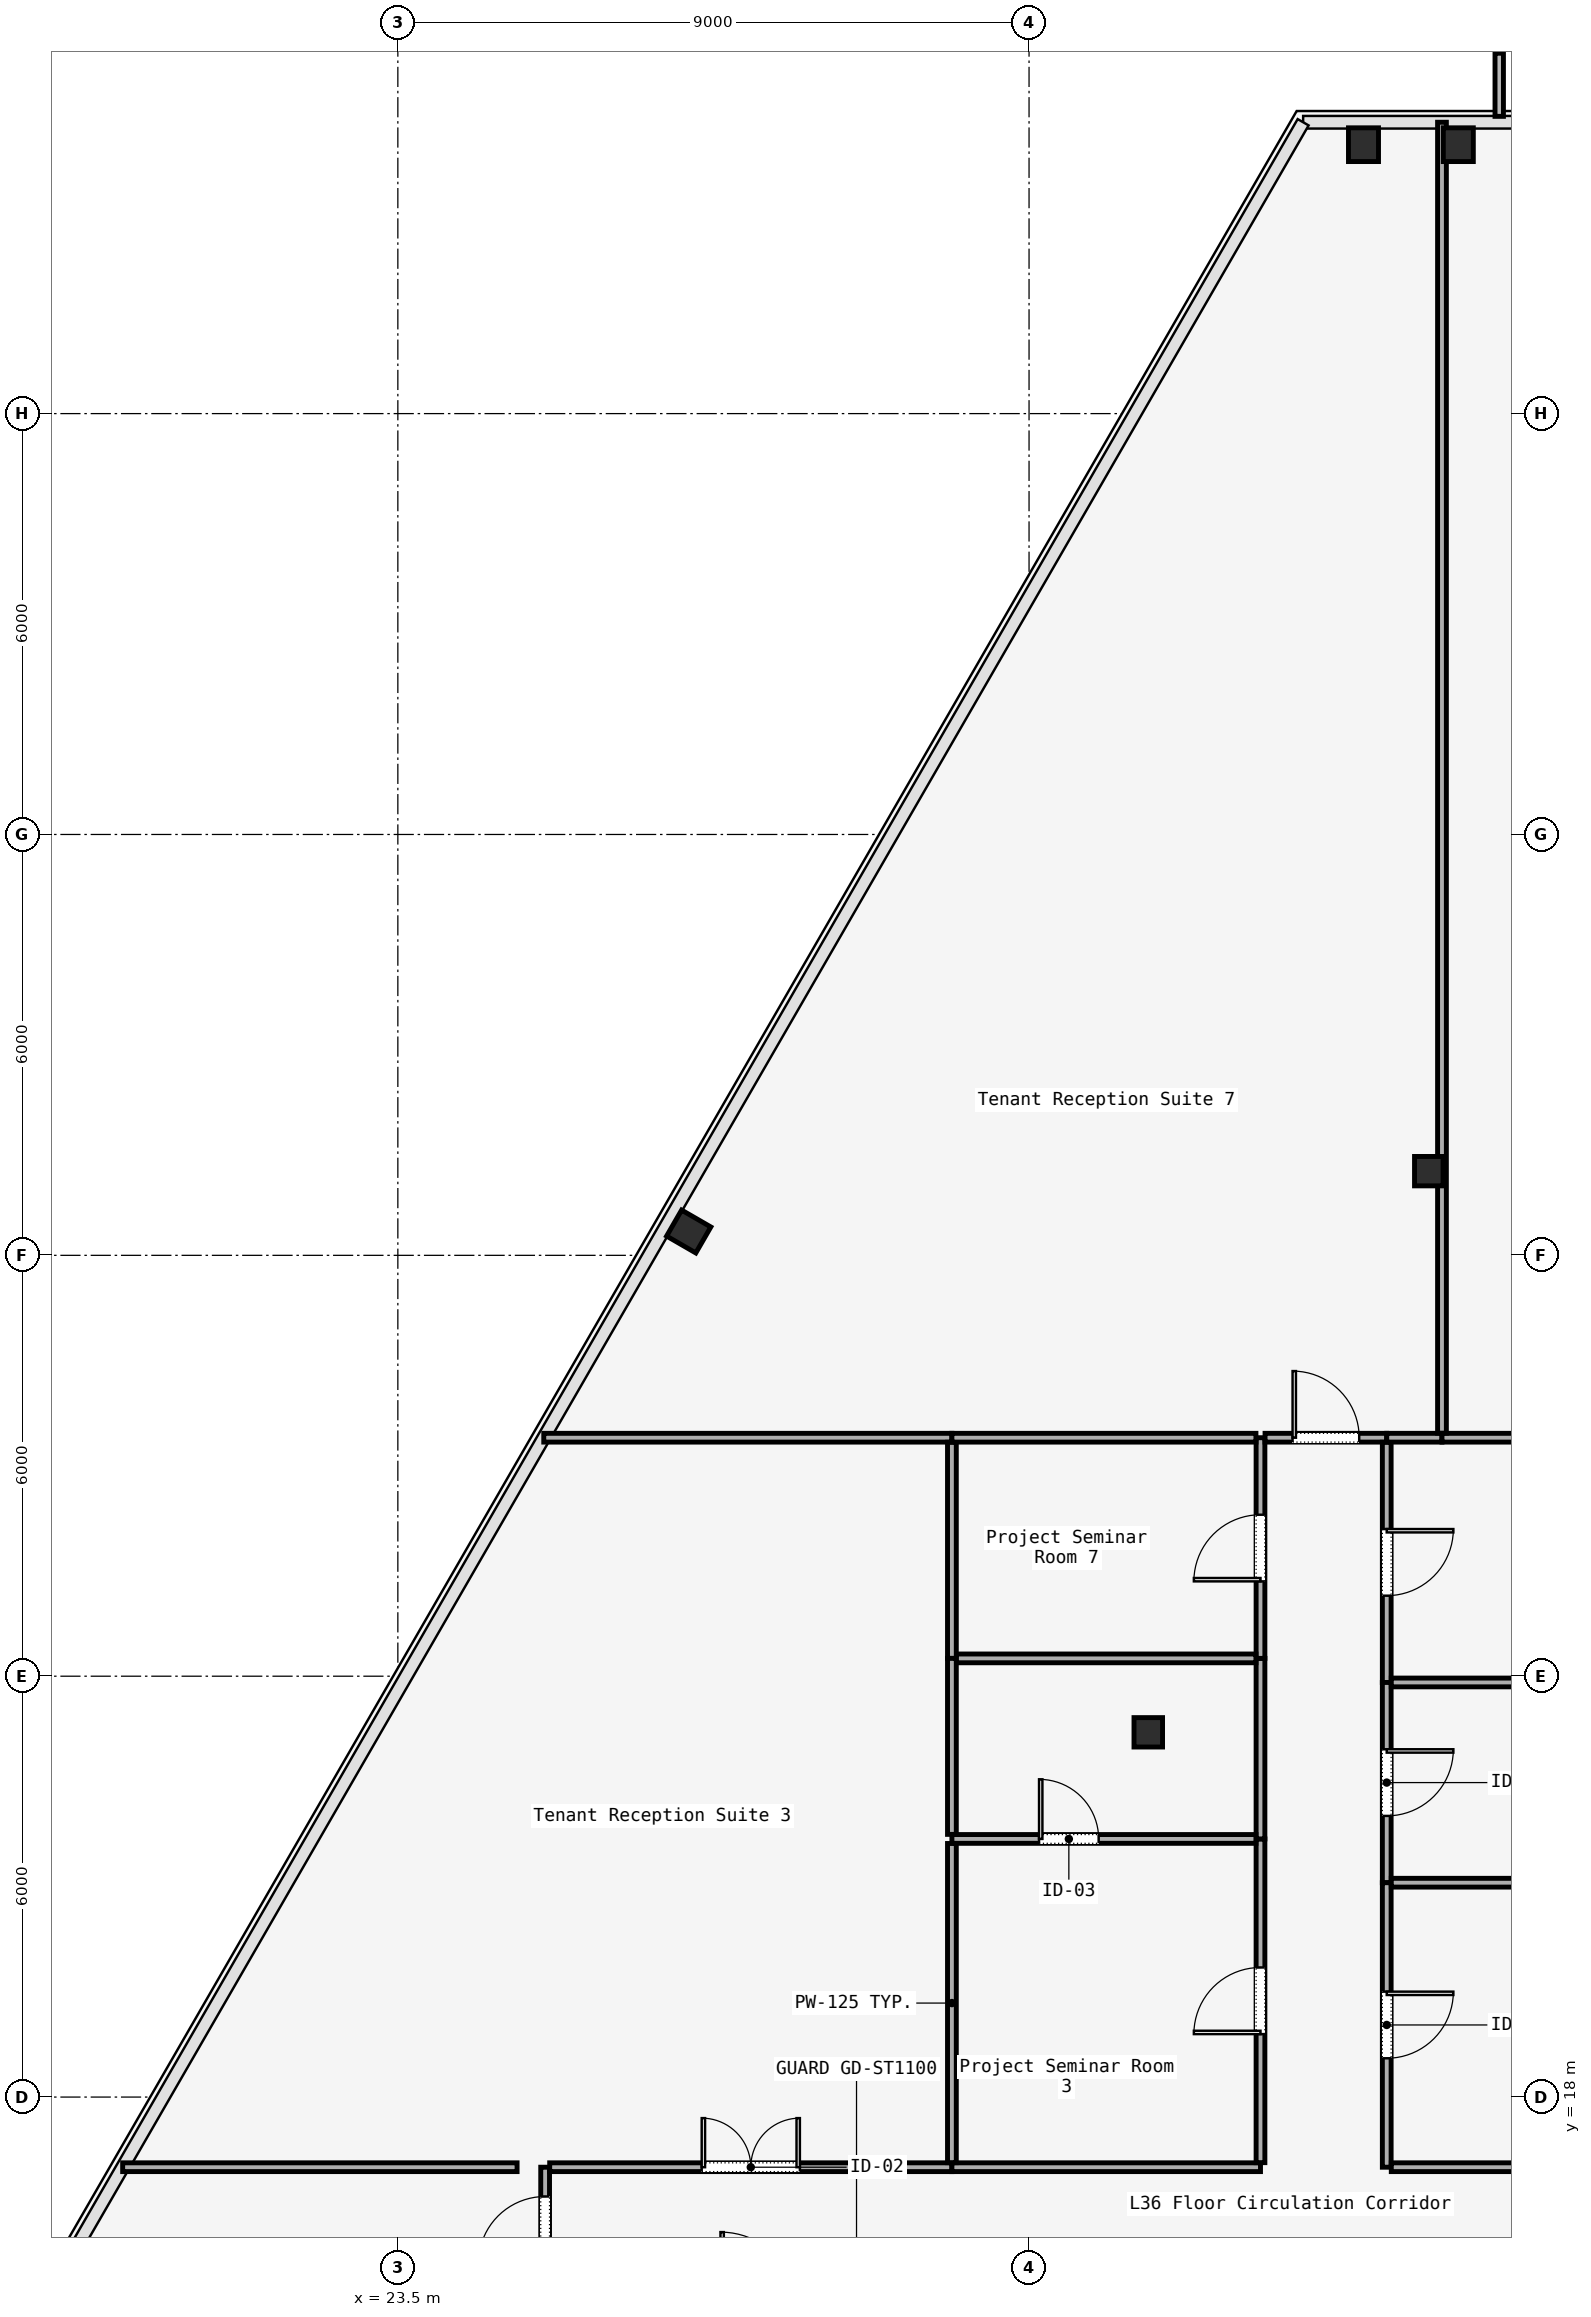
"""IFC4 building model, lengths in metres.
Left out: names, types, materials, properties, quantities, classifications, styles, units other than length and angle.
Written with IfcOpenShell. Run it as: python <this file> out.ifc"""

import sys

from ifc_helpers import new_model, si_unit, direction, frame, frame_2d, origin, origin_2d, place, context, subcontext, project, spatial, rectangle, i_section, extrude, element, fill, save


model = new_model("IFC4")
c1 = context("Model", 3, precision=1e-05, world=origin(), true_north=direction((0.0, 1.0)))
c2 = subcontext(c1, "Body", "Model", "MODEL_VIEW")
j1 = project(units=[si_unit("LENGTHUNIT", "METRE"), si_unit("PLANEANGLEUNIT", "RADIAN")], contexts=[c1])
p1 = place(None, origin())
s1 = spatial("IfcSite", under=j1, at=p1, CompositionType="ELEMENT")
p2 = place(p1, origin())
s2 = spatial("IfcBuilding", under=s1, at=p2, CompositionType="ELEMENT")
p3 = place(p2, frame((0.0, 0.0, 153.6)))
s3 = spatial("IfcBuildingStorey", under=s2, at=p3, CompositionType="ELEMENT", Elevation=153.6)
for number, where, z_axis, x_axis in (
    (1, (34.2, 23.2, 0.0), (0.0, 0.0, 1.0), (1.0, 0.0, 0.0)),
    (2, (38.2, 31.2, 0.0), (0.0, 0.0, 1.0), (1.0, 0.0, 0.0)),
):
    element("IfcColumn", number, at=place(p3, frame(where, z_axis=z_axis, x_axis=x_axis)), inside=s3, PredefinedType="COLUMN", context=c2, shape_type="SweptSolid", body=[
        extrude(i_section(OverallWidth=0.407, OverallDepth=0.419, WebThickness=0.031, FlangeThickness=0.049, FilletRadius=0.015, at=origin_2d()), origin(), (0.0, 0.0, 1.0), 3.58),
    ])
for number, where, z_axis, x_axis in (
    (3, (38.621, 45.834, 0.0), (0.0, 0.0, 1.0), (1.0, 0.0, 0.0)),
    (4, (37.269, 45.834, 0.0), (0.0, 0.0, 1.0), (1.0, 0.0, 0.0)),
    (5, (27.647, 30.34, 0.0), (0.0, 0.0, 1.0), (0.5, 0.866, 0.0)),
):
    element("IfcColumn", number, at=place(p3, frame(where, z_axis=z_axis, x_axis=x_axis)), inside=s3, PredefinedType="COLUMN", context=c2, shape_type="SweptSolid", body=[
        extrude(i_section(OverallWidth=0.428, OverallDepth=0.481, WebThickness=0.051, FlangeThickness=0.065, FilletRadius=0.015, at=origin_2d()), origin(), (0.0, 0.0, 1.0), 3.58),
    ])
p4 = place(p3, frame((25.6, 15.215, 0.0), z_axis=(0.0, 0.0, 1.0), x_axis=(0.0, 1.0, 0.0)))
e6 = element("IfcWall", 6, at=p4, inside=s3, PredefinedType="PARTITIONING", context=c2, shape_type="SweptSolid", body=[
    extrude(rectangle(XDim=1.785, YDim=0.125, at=frame_2d((0.893, 0.0))), origin(), (0.0, 0.0, 1.0), 3.01),
])
p5 = place(p4, frame((0.417, 0.0, 0.0)))
e7 = element("IfcOpeningElement", 7, at=p5, cuts=e6, PredefinedType="OPENING", context=c2, shape_type="SweptSolid", body=[
    extrude(rectangle(XDim=0.95, YDim=2.2, at=frame_2d((0.475, 1.1))), frame((0.0, 0.062, 0.0), z_axis=(0.0, -1.0, 0.0), x_axis=(1.0, 0.0, 0.0)), (0.0, 0.0, 1.0), 0.125),
])
p6 = place(p3, frame((25.665, 17.0, 0.0), z_axis=(0.0, 0.0, 1.0), x_axis=(1.0, 0.0, 0.0)))
e8 = element("IfcWall", 8, at=p6, inside=s3, PredefinedType="PARTITIONING", context=c2, shape_type="SweptSolid", body=[
    extrude(rectangle(XDim=5.735, YDim=0.125, at=frame_2d((2.867, 0.0))), origin(), (0.0, 0.0, 1.0), 3.01),
])
p7 = place(p6, frame((2.167, 0.0, 0.0)))
e9 = element("IfcOpeningElement", 9, at=p7, cuts=e8, PredefinedType="OPENING", context=c2, shape_type="SweptSolid", body=[
    extrude(rectangle(XDim=1.4, YDim=2.2, at=frame_2d((0.7, 1.1))), frame((0.0, 0.062, 0.0), z_axis=(0.0, -1.0, 0.0), x_axis=(1.0, 0.0, 0.0)), (0.0, 0.0, 1.0), 0.125),
])
p8 = place(p3, frame((31.4, 17.0, 0.0), z_axis=(0.0, 0.0, 1.0), x_axis=(1.0, 0.0, 0.0)))
e10 = element("IfcWall", 10, at=p8, inside=s3, PredefinedType="PARTITIONING", context=c2, shape_type="SweptSolid", body=[
    extrude(rectangle(XDim=4.4, YDim=0.125, at=frame_2d((2.2, 0.0))), origin(), (0.0, 0.0, 1.0), 3.01),
])
p9 = place(p3, frame((35.8, 17.065, 0.0), z_axis=(0.0, 0.0, 1.0), x_axis=(0.0, 1.0, 0.0)))
e11 = element("IfcWall", 11, at=p9, inside=s3, PredefinedType="PARTITIONING", context=c2, shape_type="SweptSolid", body=[
    extrude(rectangle(XDim=4.615, YDim=0.125, at=frame_2d((2.308, 0.0))), origin(), (0.0, 0.0, 1.0), 3.01),
])
p10 = place(p9, frame((1.833, 0.0, 0.0)))
e12 = element("IfcOpeningElement", 12, at=p10, cuts=e11, PredefinedType="OPENING", context=c2, shape_type="SweptSolid", body=[
    extrude(rectangle(XDim=0.95, YDim=2.2, at=frame_2d((0.475, 1.1))), frame((0.0, 0.062, 0.0), z_axis=(0.0, -1.0, 0.0), x_axis=(1.0, 0.0, 0.0)), (0.0, 0.0, 1.0), 0.125),
])
p11 = place(p3, frame((35.8, 21.68, 0.0), z_axis=(0.0, 0.0, 1.0), x_axis=(0.0, 1.0, 0.0)))
e13 = element("IfcWall", 13, at=p11, inside=s3, PredefinedType="PARTITIONING", context=c2, shape_type="SweptSolid", body=[
    extrude(rectangle(XDim=2.574, YDim=0.125, at=frame_2d((1.287, 0.0))), origin(), (0.0, 0.0, 1.0), 3.01),
])
p12 = place(p3, frame((35.8, 24.254, 0.0), z_axis=(0.0, 0.0, 1.0), x_axis=(0.0, 1.0, 0.0)))
e14 = element("IfcWall", 14, at=p12, inside=s3, PredefinedType="PARTITIONING", context=c2, shape_type="SweptSolid", body=[
    extrude(rectangle(XDim=3.146, YDim=0.125, at=frame_2d((1.573, 0.0))), origin(), (0.0, 0.0, 1.0), 3.01),
])
p13 = place(p12, frame((1.098, 0.0, 0.0)))
e15 = element("IfcOpeningElement", 15, at=p13, cuts=e14, PredefinedType="OPENING", context=c2, shape_type="SweptSolid", body=[
    extrude(rectangle(XDim=0.95, YDim=2.2, at=frame_2d((0.475, 1.1))), frame((0.0, 0.062, 0.0), z_axis=(0.0, -1.0, 0.0), x_axis=(1.0, 0.0, 0.0)), (0.0, 0.0, 1.0), 0.125),
])
p14 = place(p3, frame((35.865, 27.4, 0.0), z_axis=(0.0, 0.0, 1.0), x_axis=(1.0, 0.0, 0.0)))
e16 = element("IfcWall", 16, at=p14, inside=s3, PredefinedType="PARTITIONING", context=c2, shape_type="SweptSolid", body=[
    extrude(rectangle(XDim=1.735, YDim=0.125, at=frame_2d((0.868, 0.0))), origin(), (0.0, 0.0, 1.0), 3.01),
])
p15 = place(p14, frame((0.393, 0.0, 0.0)))
e17 = element("IfcOpeningElement", 17, at=p15, cuts=e16, PredefinedType="OPENING", context=c2, shape_type="SweptSolid", body=[
    extrude(rectangle(XDim=0.95, YDim=2.2, at=frame_2d((0.475, 1.1))), frame((0.0, 0.062, 0.0), z_axis=(0.0, -1.0, 0.0), x_axis=(1.0, 0.0, 0.0)), (0.0, 0.0, 1.0), 0.125),
])
p16 = place(p3, frame((37.6, 27.335, 0.0), z_axis=(0.0, 0.0, 1.0), x_axis=(0.0, -1.0, 0.0)))
e18 = element("IfcWall", 18, at=p16, inside=s3, PredefinedType="PARTITIONING", context=c2, shape_type="SweptSolid", body=[
    extrude(rectangle(XDim=3.424, YDim=0.125, at=frame_2d((1.712, 0.0))), origin(), (0.0, 0.0, 1.0), 3.01),
])
p17 = place(p16, frame((1.237, 0.0, 0.0)))
e19 = element("IfcOpeningElement", 19, at=p17, cuts=e18, PredefinedType="OPENING", context=c2, shape_type="SweptSolid", body=[
    extrude(rectangle(XDim=0.95, YDim=2.2, at=frame_2d((0.475, 1.1))), frame((0.0, 0.062, 0.0), z_axis=(0.0, -1.0, 0.0), x_axis=(1.0, 0.0, 0.0)), (0.0, 0.0, 1.0), 0.125),
])
p18 = place(p3, frame((37.6, 23.911, 0.0), z_axis=(0.0, 0.0, 1.0), x_axis=(0.0, -1.0, 0.0)))
e20 = element("IfcWall", 20, at=p18, inside=s3, PredefinedType="PARTITIONING", context=c2, shape_type="SweptSolid", body=[
    extrude(rectangle(XDim=2.855, YDim=0.125, at=frame_2d((1.427, 0.0))), origin(), (0.0, 0.0, 1.0), 3.01),
])
p19 = place(p18, frame((0.952, 0.0, 0.0)))
e21 = element("IfcOpeningElement", 21, at=p19, cuts=e20, PredefinedType="OPENING", context=c2, shape_type="SweptSolid", body=[
    extrude(rectangle(XDim=0.95, YDim=2.2, at=frame_2d((0.475, 1.1))), frame((0.0, 0.062, 0.0), z_axis=(0.0, -1.0, 0.0), x_axis=(1.0, 0.0, 0.0)), (0.0, 0.0, 1.0), 0.125),
])
p20 = place(p3, frame((37.6, 21.056, 0.0), z_axis=(0.0, 0.0, 1.0), x_axis=(0.0, -1.0, 0.0)))
e22 = element("IfcWall", 22, at=p20, inside=s3, PredefinedType="PARTITIONING", context=c2, shape_type="SweptSolid", body=[
    extrude(rectangle(XDim=4.056, YDim=0.125, at=frame_2d((2.028, 0.0))), origin(), (0.0, 0.0, 1.0), 3.01),
])
p21 = place(p20, frame((1.553, 0.0, 0.0)))
e23 = element("IfcOpeningElement", 23, at=p21, cuts=e22, PredefinedType="OPENING", context=c2, shape_type="SweptSolid", body=[
    extrude(rectangle(XDim=0.95, YDim=2.2, at=frame_2d((0.475, 1.1))), frame((0.0, 0.062, 0.0), z_axis=(0.0, -1.0, 0.0), x_axis=(1.0, 0.0, 0.0)), (0.0, 0.0, 1.0), 0.125),
])
p22 = place(p3, frame((37.665, 17.0, 0.0), z_axis=(0.0, 0.0, 1.0), x_axis=(1.0, 0.0, 0.0)))
e24 = element("IfcWall", 24, at=p22, inside=s3, PredefinedType="PARTITIONING", context=c2, shape_type="SweptSolid", body=[
    extrude(rectangle(XDim=3.445, YDim=0.125, at=frame_2d((1.723, 0.0))), origin(), (0.0, 0.0, 1.0), 3.01),
])
p23 = place(p3, frame((19.576, 17.0, 0.0), z_axis=(0.0, 0.0, 1.0), x_axis=(1.0, 0.0, 0.0)))
e25 = element("IfcWall", 25, at=p23, inside=s3, PredefinedType="PARTITIONING", context=c2, shape_type="SweptSolid", body=[
    extrude(rectangle(XDim=5.624, YDim=0.125, at=frame_2d((2.812, 0.0))), origin(), (0.0, 0.0, 1.0), 3.01),
])
p24 = place(p3, frame((37.665, 21.056, 0.0), z_axis=(0.0, 0.0, 1.0), x_axis=(1.0, 0.0, 0.0)))
e26 = element("IfcWall", 26, at=p24, inside=s3, PredefinedType="PARTITIONING", context=c2, shape_type="SweptSolid", body=[
    extrude(rectangle(XDim=3.38, YDim=0.125, at=frame_2d((1.69, 0.0))), origin(), (0.0, 0.0, 1.0), 3.01),
])
p25 = place(p3, frame((31.4, 21.68, 0.0), z_axis=(0.0, 0.0, 1.0), x_axis=(1.0, 0.0, 0.0)))
e27 = element("IfcWall", 27, at=p25, inside=s3, PredefinedType="PARTITIONING", context=c2, shape_type="SweptSolid", body=[
    extrude(rectangle(XDim=4.335, YDim=0.125, at=frame_2d((2.167, 0.0))), origin(), (0.0, 0.0, 1.0), 3.01),
])
p26 = place(p25, frame((1.242, 0.0, 0.0)))
e28 = element("IfcOpeningElement", 28, at=p26, cuts=e27, PredefinedType="OPENING", context=c2, shape_type="SweptSolid", body=[
    extrude(rectangle(XDim=0.85, YDim=2.15, at=frame_2d((0.425, 1.075))), frame((0.0, 0.062, 0.0), z_axis=(0.0, -1.0, 0.0), x_axis=(1.0, 0.0, 0.0)), (0.0, 0.0, 1.0), 0.125),
])
p27 = place(p3, frame((31.4, 17.065, 0.0), z_axis=(0.0, 0.0, 1.0), x_axis=(0.0, 1.0, 0.0)))
e29 = element("IfcWall", 29, at=p27, inside=s3, PredefinedType="PARTITIONING", context=c2, shape_type="SweptSolid", body=[
    extrude(rectangle(XDim=4.55, YDim=0.125, at=frame_2d((2.275, 0.0))), origin(), (0.0, 0.0, 1.0), 3.01),
])
p28 = place(p3, frame((25.581, 27.4, 0.0), z_axis=(0.0, 0.0, 1.0), x_axis=(1.0, 0.0, 0.0)))
e30 = element("IfcWall", 30, at=p28, inside=s3, PredefinedType="PARTITIONING", context=c2, shape_type="SweptSolid", body=[
    extrude(rectangle(XDim=5.819, YDim=0.125, at=frame_2d((2.91, 0.0))), origin(), (0.0, 0.0, 1.0), 3.01),
])
p29 = place(p3, frame((31.4, 27.335, 0.0), z_axis=(0.0, 0.0, 1.0), x_axis=(0.0, -1.0, 0.0)))
e31 = element("IfcWall", 31, at=p29, inside=s3, PredefinedType="PARTITIONING", context=c2, shape_type="SweptSolid", body=[
    extrude(rectangle(XDim=3.081, YDim=0.125, at=frame_2d((1.541, 0.0))), origin(), (0.0, 0.0, 1.0), 3.01),
])
p30 = place(p3, frame((31.4, 24.254, 0.0), z_axis=(0.0, 0.0, 1.0), x_axis=(0.0, -1.0, 0.0)))
e32 = element("IfcWall", 32, at=p30, inside=s3, PredefinedType="PARTITIONING", context=c2, shape_type="SweptSolid", body=[
    extrude(rectangle(XDim=2.509, YDim=0.125, at=frame_2d((1.254, 0.0))), origin(), (0.0, 0.0, 1.0), 3.01),
])
p31 = place(p3, frame((37.665, 23.911, 0.0), z_axis=(0.0, 0.0, 1.0), x_axis=(1.0, 0.0, 0.0)))
e33 = element("IfcWall", 33, at=p31, inside=s3, PredefinedType="PARTITIONING", context=c2, shape_type="SweptSolid", body=[
    extrude(rectangle(XDim=3.985, YDim=0.125, at=frame_2d((1.992, 0.0))), origin(), (0.0, 0.0, 1.0), 3.01),
])
p32 = place(p3, frame((31.465, 24.254, 0.0), z_axis=(0.0, 0.0, 1.0), x_axis=(1.0, 0.0, 0.0)))
e34 = element("IfcWall", 34, at=p32, inside=s3, PredefinedType="PARTITIONING", context=c2, shape_type="SweptSolid", body=[
    extrude(rectangle(XDim=4.27, YDim=0.125, at=frame_2d((2.135, 0.0))), origin(), (0.0, 0.0, 1.0), 3.01),
])
p33 = place(p3, frame((37.6, 27.4, 0.0), z_axis=(0.0, 0.0, 1.0), x_axis=(1.0, 0.0, 0.0)))
e35 = element("IfcWall", 35, at=p33, inside=s3, PredefinedType="PARTITIONING", context=c2, shape_type="SweptSolid", body=[
    extrude(rectangle(XDim=0.788, YDim=0.125, at=frame_2d((0.394, 0.0))), origin(), (0.0, 0.0, 1.0), 3.01),
])
p34 = place(p3, frame((38.388, 27.4, 0.0), z_axis=(0.0, 0.0, 1.0), x_axis=(1.0, 0.0, 0.0)))
e36 = element("IfcWall", 36, at=p34, inside=s3, PredefinedType="PARTITIONING", context=c2, shape_type="SweptSolid", body=[
    extrude(rectangle(XDim=3.197, YDim=0.125, at=frame_2d((1.599, 0.0))), origin(), (0.0, 0.0, 1.0), 3.01),
])
p35 = place(p3, frame((31.4, 27.4, 0.0), z_axis=(0.0, 0.0, 1.0), x_axis=(1.0, 0.0, 0.0)))
e37 = element("IfcWall", 37, at=p35, inside=s3, PredefinedType="PARTITIONING", context=c2, shape_type="SweptSolid", body=[
    extrude(rectangle(XDim=4.335, YDim=0.125, at=frame_2d((2.167, 0.0))), origin(), (0.0, 0.0, 1.0), 3.01),
])
p36 = place(p3, frame((38.388, 46.154, 0.0), z_axis=(0.0, 0.0, 1.0), x_axis=(0.0, -1.0, 0.0)))
e38 = element("IfcWall", 38, at=p36, inside=s3, PredefinedType="PARTITIONING", context=c2, shape_type="SweptSolid", body=[
    extrude(rectangle(XDim=18.689, YDim=0.125, at=frame_2d((9.344, 0.0))), origin(), (0.0, 0.0, 1.0), 3.01),
])
p37 = place(p5, origin())
e39 = element("IfcDoor", 39, at=p37, inside=s3, OperationType="SINGLE_SWING_LEFT", PredefinedType="DOOR", context=c2, shape_type="SweptSolid", body=[
    extrude(rectangle(XDim=0.95, YDim=2.2, at=frame_2d((0.475, 1.1))), frame((0.0, 0.025, 0.0), z_axis=(0.0, -1.0, 0.0), x_axis=(1.0, 0.0, 0.0)), (0.0, 0.0, 1.0), 0.05),
])
fill(e7, e39)
p38 = place(p21, origin())
e40 = element("IfcDoor", 40, at=p38, inside=s3, OperationType="SINGLE_SWING_LEFT", PredefinedType="DOOR", context=c2, shape_type="SweptSolid", body=[
    extrude(rectangle(XDim=0.95, YDim=2.2, at=frame_2d((0.475, 1.1))), frame((0.0, 0.025, 0.0), z_axis=(0.0, -1.0, 0.0), x_axis=(1.0, 0.0, 0.0)), (0.0, 0.0, 1.0), 0.05),
])
fill(e23, e40)
p39 = place(p10, origin())
e41 = element("IfcDoor", 41, at=p39, inside=s3, OperationType="SINGLE_SWING_LEFT", PredefinedType="DOOR", context=c2, shape_type="SweptSolid", body=[
    extrude(rectangle(XDim=0.95, YDim=2.2, at=frame_2d((0.475, 1.1))), frame((0.0, 0.025, 0.0), z_axis=(0.0, -1.0, 0.0), x_axis=(1.0, 0.0, 0.0)), (0.0, 0.0, 1.0), 0.05),
])
fill(e12, e41)
p40 = place(p7, origin())
e42 = element("IfcDoor", 42, at=p40, inside=s3, OperationType="SINGLE_SWING_LEFT", PredefinedType="DOOR", context=c2, shape_type="SweptSolid", body=[
    extrude(rectangle(XDim=1.4, YDim=2.2, at=frame_2d((0.7, 1.1))), frame((0.0, 0.025, 0.0), z_axis=(0.0, -1.0, 0.0), x_axis=(1.0, 0.0, 0.0)), (0.0, 0.0, 1.0), 0.05),
])
fill(e9, e42)
p41 = place(p19, origin())
e43 = element("IfcDoor", 43, at=p41, inside=s3, OperationType="SINGLE_SWING_LEFT", PredefinedType="DOOR", context=c2, shape_type="SweptSolid", body=[
    extrude(rectangle(XDim=0.95, YDim=2.2, at=frame_2d((0.475, 1.1))), frame((0.0, 0.025, 0.0), z_axis=(0.0, -1.0, 0.0), x_axis=(1.0, 0.0, 0.0)), (0.0, 0.0, 1.0), 0.05),
])
fill(e21, e43)
p42 = place(p26, origin())
e44 = element("IfcDoor", 44, at=p42, inside=s3, OperationType="SINGLE_SWING_LEFT", PredefinedType="DOOR", context=c2, shape_type="SweptSolid", body=[
    extrude(rectangle(XDim=0.85, YDim=2.15, at=frame_2d((0.425, 1.075))), frame((0.0, 0.025, 0.0), z_axis=(0.0, -1.0, 0.0), x_axis=(1.0, 0.0, 0.0)), (0.0, 0.0, 1.0), 0.05),
])
fill(e28, e44)
p43 = place(p17, origin())
e45 = element("IfcDoor", 45, at=p43, inside=s3, OperationType="SINGLE_SWING_RIGHT", PredefinedType="DOOR", context=c2, shape_type="SweptSolid", body=[
    extrude(rectangle(XDim=0.95, YDim=2.2, at=frame_2d((0.475, 1.1))), frame((0.0, 0.025, 0.0), z_axis=(0.0, -1.0, 0.0), x_axis=(1.0, 0.0, 0.0)), (0.0, 0.0, 1.0), 0.05),
])
fill(e19, e45)
p44 = place(p13, origin())
e46 = element("IfcDoor", 46, at=p44, inside=s3, OperationType="SINGLE_SWING_LEFT", PredefinedType="DOOR", context=c2, shape_type="SweptSolid", body=[
    extrude(rectangle(XDim=0.95, YDim=2.2, at=frame_2d((0.475, 1.1))), frame((0.0, 0.025, 0.0), z_axis=(0.0, -1.0, 0.0), x_axis=(1.0, 0.0, 0.0)), (0.0, 0.0, 1.0), 0.05),
])
fill(e15, e46)
p45 = place(p15, origin())
e47 = element("IfcDoor", 47, at=p45, inside=s3, OperationType="SINGLE_SWING_RIGHT", PredefinedType="DOOR", context=c2, shape_type="SweptSolid", body=[
    extrude(rectangle(XDim=0.95, YDim=2.2, at=frame_2d((0.475, 1.1))), frame((0.0, 0.025, 0.0), z_axis=(0.0, -1.0, 0.0), x_axis=(1.0, 0.0, 0.0)), (0.0, 0.0, 1.0), 0.05),
])
fill(e17, e47)
save(model, sys.argv[1])
